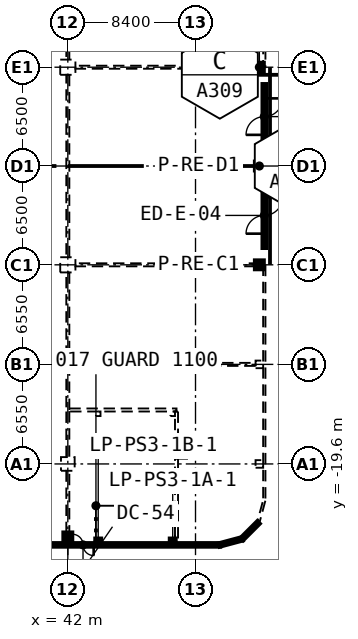
"""IFC4 building model, lengths in metres.
Left out: names, types, materials, properties, quantities, classifications, styles, units other than length and angle.
Written with IfcOpenShell. Run it as: python <this file> out.ifc"""

import sys

from ifc_helpers import new_model, si_unit, direction, frame, frame_2d, origin, origin_2d, place, context, subcontext, project, spatial, rectangle, hollow_rectangle, extrude, element, fill, save


model = new_model("IFC4")
c1 = context("Model", 3, precision=1e-05, world=origin(), true_north=direction((0.0, 1.0)))
c2 = subcontext(c1, "Body", "Model", "MODEL_VIEW")
j1 = project(units=[si_unit("LENGTHUNIT", "METRE"), si_unit("PLANEANGLEUNIT", "RADIAN")], contexts=[c1])
p1 = place(None, origin())
s1 = spatial("IfcSite", under=j1, at=p1, CompositionType="ELEMENT")
p2 = place(p1, origin())
s2 = spatial("IfcBuilding", under=s1, at=p2, CompositionType="ELEMENT")
p3 = place(p2, origin())
s3 = spatial("IfcBuildingStorey", under=s2, at=p3, CompositionType="ELEMENT", Elevation=0.0)
p4 = place(p3, frame((42.0, -19.6, -0.3), z_axis=(0.0, 0.0, 1.0), x_axis=(1.0, 0.0, 0.0)))
e1 = element("IfcColumn", 1, at=p4, inside=s3, PredefinedType="COLUMN", context=c2, shape_type="SweptSolid", body=[
    extrude(hollow_rectangle(XDim=0.9, YDim=0.9, WallThickness=0.036, at=origin_2d()), origin(), (0.0, 0.0, 1.0), 8.9),
])
for number, where, z_axis, x_axis in (
    (2, (42.0, -6.5, -0.3), (0.0, 0.0, 1.0), (1.0, 0.0, 0.0)),
    (3, (42.0, 6.5, -0.3), (0.0, 0.0, 1.0), (1.0, 0.0, 0.0)),
):
    element("IfcColumn", number, at=place(p3, frame(where, z_axis=z_axis, x_axis=x_axis)), inside=s3, PredefinedType="COLUMN", context=c2, shape_type="SweptSolid", body=[
        extrude(hollow_rectangle(XDim=1.0, YDim=1.0, WallThickness=0.04, at=origin_2d()), origin(), (0.0, 0.0, 1.0), 8.9),
    ])
for number, where, z_axis, x_axis in (
    (4, (49.603, -18.803, -0.3), (0.0, 0.0, 1.0), (1.0, 0.0, 0.0)),
    (5, (50.4, -6.5, -0.3), (0.0, 0.0, 1.0), (1.0, 0.0, 0.0)),
    (6, (50.4, 6.5, -0.3), (0.0, 0.0, 1.0), (1.0, 0.0, 0.0)),
):
    element("IfcColumn", number, at=place(p3, frame(where, z_axis=z_axis, x_axis=x_axis)), inside=s3, PredefinedType="COLUMN", context=c2, shape_type="SweptSolid", body=[
        extrude(hollow_rectangle(XDim=0.9, YDim=0.9, WallThickness=0.036, at=origin_2d()), origin(), (0.0, 0.0, 1.0), 8.9),
    ])
for number, where, z_axis, x_axis in (
    (7, (42.0, -24.4, -0.3), (0.0, 0.0, 1.0), (1.0, 0.0, 0.0)),
    (8, (54.6, -19.6, -0.3), (0.0, 0.0, 1.0), (1.0, 0.0, 0.0)),
    (9, (54.6, -13.05, -0.3), (0.0, 0.0, 1.0), (1.0, 0.0, 0.0)),
    (10, (54.6, -6.5, -0.3), (0.0, 0.0, 1.0), (1.0, 0.0, 0.0)),
    (11, (54.6, 0.0, -0.3), (0.0, 0.0, 1.0), (1.0, 0.0, 0.0)),
    (12, (54.6, 6.5, -0.3), (0.0, 0.0, 1.0), (1.0, 0.0, 0.0)),
):
    element("IfcColumn", number, at=place(p3, frame(where, z_axis=z_axis, x_axis=x_axis)), inside=s3, PredefinedType="COLUMN", context=c2, shape_type="SweptSolid", body=[
        extrude(hollow_rectangle(XDim=0.5, YDim=0.5, WallThickness=0.019, InnerFilletRadius=0.029, OuterFilletRadius=0.048, at=origin_2d()), origin(), (0.0, 0.0, 1.0), 8.9),
    ])
p5 = place(p3, frame((54.35, -6.5, 0.0), z_axis=(0.0, 0.0, 1.0), x_axis=(-1.0, 0.0, 0.0)))
e13 = element("IfcWall", 13, at=p5, inside=s3, PredefinedType="PARTITIONING", context=c2, shape_type="SweptSolid", body=[
    extrude(rectangle(XDim=3.5, YDim=0.2, at=frame_2d((1.75, 0.0))), origin(), (0.0, 0.0, 1.0), 8.6),
])
p6 = place(p3, frame((49.95, -6.5, 0.0), z_axis=(0.0, 0.0, 1.0), x_axis=(-1.0, 0.0, 0.0)))
e14 = element("IfcWall", 14, at=p6, inside=s3, PredefinedType="PARTITIONING", context=c2, shape_type="SweptSolid", body=[
    extrude(rectangle(XDim=7.45, YDim=0.2, at=frame_2d((3.725, 0.0))), origin(), (0.0, 0.0, 1.0), 8.6),
])
p7 = place(p3, frame((42.0, 6.0, 0.0), z_axis=(0.0, 0.0, 1.0), x_axis=(0.0, -1.0, 0.0)))
e15 = element("IfcWall", 15, at=p7, inside=s3, PredefinedType="PARTITIONING", context=c2, shape_type="SweptSolid", body=[
    extrude(rectangle(XDim=12.0, YDim=0.2, at=frame_2d((6.0, 0.0))), origin(), (0.0, 0.0, 1.0), 8.6),
])
p8 = place(p7, frame((1.85, 0.0, 0.0)))
e16 = element("IfcOpeningElement", 16, at=p8, cuts=e15, PredefinedType="OPENING", context=c2, shape_type="SweptSolid", body=[
    extrude(rectangle(XDim=1.8, YDim=2.1, at=frame_2d((0.9, 1.05))), frame((0.0, 0.11, 0.0), z_axis=(0.0, -1.0, 0.0), x_axis=(1.0, 0.0, 0.0)), (0.0, 0.0, 1.0), 0.22),
])
p9 = place(p3, frame((42.0, 13.05, 0.0), z_axis=(0.0, 0.0, 1.0), x_axis=(0.0, -1.0, 0.0)))
e17 = element("IfcWall", 17, at=p9, inside=s3, PredefinedType="PARTITIONING", context=c2, shape_type="SweptSolid", body=[
    extrude(rectangle(XDim=6.05, YDim=0.2, at=frame_2d((3.025, 0.0))), origin(), (0.0, 0.0, 1.0), 8.6),
])
p10 = place(p9, frame((2.675, 0.0, 0.0)))
e18 = element("IfcOpeningElement", 18, at=p10, cuts=e17, PredefinedType="OPENING", context=c2, shape_type="SweptSolid", body=[
    extrude(rectangle(XDim=1.2, YDim=2.1, at=frame_2d((0.6, 1.05))), frame((0.0, 0.11, 0.0), z_axis=(0.0, -1.0, 0.0), x_axis=(1.0, 0.0, 0.0)), (0.0, 0.0, 1.0), 0.22),
])
p11 = place(p3, frame((42.0, -13.05, 0.0), z_axis=(0.0, 0.0, 1.0), x_axis=(0.0, -1.0, 0.0)))
e19 = element("IfcWall", 19, at=p11, inside=s3, PredefinedType="PARTITIONING", context=c2, shape_type="SweptSolid", body=[
    extrude(rectangle(XDim=3.0, YDim=0.2, at=frame_2d((1.5, 0.0))), origin(), (0.0, 0.0, 1.0), 8.6),
])
p12 = place(p11, frame((1.6, 0.0, 0.0)))
e20 = element("IfcOpeningElement", 20, at=p12, cuts=e19, PredefinedType="OPENING", context=c2, shape_type="SweptSolid", body=[
    extrude(rectangle(XDim=1.2, YDim=2.1, at=frame_2d((0.6, 1.05))), frame((0.0, 0.11, 0.0), z_axis=(0.0, -1.0, 0.0), x_axis=(1.0, 0.0, 0.0)), (0.0, 0.0, 1.0), 0.22),
])
p13 = place(p3, frame((42.0, -7.0, 0.0), z_axis=(0.0, 0.0, 1.0), x_axis=(0.0, -1.0, 0.0)))
e21 = element("IfcWall", 21, at=p13, inside=s3, PredefinedType="PARTITIONING", context=c2, shape_type="SweptSolid", body=[
    extrude(rectangle(XDim=6.05, YDim=0.2, at=frame_2d((3.025, 0.0))), origin(), (0.0, 0.0, 1.0), 8.6),
])
p14 = place(p13, frame((2.175, 0.0, 0.0)))
e22 = element("IfcOpeningElement", 22, at=p14, cuts=e21, PredefinedType="OPENING", context=c2, shape_type="SweptSolid", body=[
    extrude(rectangle(XDim=1.2, YDim=2.1, at=frame_2d((0.6, 1.05))), frame((0.0, 0.11, 0.0), z_axis=(0.0, -1.0, 0.0), x_axis=(1.0, 0.0, 0.0)), (0.0, 0.0, 1.0), 0.22),
])
p15 = place(p3, frame((42.0, -24.15, 0.0), z_axis=(0.0, 0.0, 1.0), x_axis=(0.0, 1.0, 0.0)))
e23 = element("IfcWall", 23, at=p15, inside=s3, PredefinedType="SHEAR", context=c2, shape_type="SweptSolid", body=[
    extrude(rectangle(XDim=4.1, YDim=0.2, at=frame_2d((2.05, 0.0))), origin(), (0.0, 0.0, 1.0), 8.6),
])
p16 = place(p15, frame((1.55, 0.0, 0.0)))
e24 = element("IfcOpeningElement", 24, at=p16, cuts=e23, PredefinedType="OPENING", context=c2, shape_type="SweptSolid", body=[
    extrude(rectangle(XDim=1.2, YDim=2.1, at=frame_2d((0.6, 1.05))), frame((0.0, 0.11, 0.0), z_axis=(0.0, -1.0, 0.0), x_axis=(1.0, 0.0, 0.0)), (0.0, 0.0, 1.0), 0.22),
])
p17 = place(p3, frame((42.0, -19.15, 0.0), z_axis=(0.0, 0.0, 1.0), x_axis=(0.0, 1.0, 0.0)))
e25 = element("IfcWall", 25, at=p17, inside=s3, PredefinedType="SHEAR", context=c2, shape_type="SweptSolid", body=[
    extrude(rectangle(XDim=3.1, YDim=0.2, at=frame_2d((1.55, 0.0))), origin(), (0.0, 0.0, 1.0), 8.6),
])
p18 = place(p3, frame((42.1, -16.05, 0.0), z_axis=(0.0, 0.0, 1.0), x_axis=(1.0, 0.0, 0.0)))
e26 = element("IfcWall", 26, at=p18, inside=s3, PredefinedType="SHEAR", context=c2, shape_type="SweptSolid", body=[
    extrude(rectangle(XDim=7.05, YDim=0.2, at=frame_2d((3.525, 0.0))), origin(), (0.0, 0.0, 1.0), 8.6),
])
p19 = place(p3, frame((49.15, -16.15, 0.0), z_axis=(0.0, 0.0, 1.0), x_axis=(0.0, -1.0, 0.0)))
e27 = element("IfcWall", 27, at=p19, inside=s3, PredefinedType="SHEAR", context=c2, shape_type="SweptSolid", body=[
    extrude(rectangle(XDim=2.203, YDim=0.2, at=frame_2d((1.102, 0.0))), origin(), (0.0, 0.0, 1.0), 8.6),
])
p20 = place(p3, frame((49.15, -19.253, 0.0), z_axis=(0.0, 0.0, 1.0), x_axis=(0.0, -1.0, 0.0)))
e28 = element("IfcWall", 28, at=p20, inside=s3, PredefinedType="SHEAR", context=c2, shape_type="SweptSolid", body=[
    extrude(rectangle(XDim=5.597, YDim=0.2, at=frame_2d((2.798, 0.0))), origin(), (0.0, 0.0, 1.0), 8.6),
])
p21 = place(p3, frame((54.35, 6.5, 0.0), z_axis=(0.0, 0.0, 1.0), x_axis=(-1.0, 0.0, 0.0)))
e29 = element("IfcWall", 29, at=p21, inside=s3, PredefinedType="PARTITIONING", context=c2, shape_type="SweptSolid", body=[
    extrude(rectangle(XDim=3.5, YDim=0.2, at=frame_2d((1.75, 0.0))), origin(), (0.0, 0.0, 1.0), 8.6),
])
p22 = place(p3, frame((49.95, 6.5, 0.0), z_axis=(0.0, 0.0, 1.0), x_axis=(-1.0, 0.0, 0.0)))
e30 = element("IfcWall", 30, at=p22, inside=s3, PredefinedType="PARTITIONING", context=c2, shape_type="SweptSolid", body=[
    extrude(rectangle(XDim=7.45, YDim=0.2, at=frame_2d((3.725, 0.0))), origin(), (0.0, 0.0, 1.0), 8.6),
])
p23 = place(p3, frame((54.35, -13.05, 0.0), z_axis=(0.0, 0.0, 1.0), x_axis=(-1.0, 0.0, 0.0)))
e31 = element("IfcWall", 31, at=p23, inside=s3, PredefinedType="PARTITIONING", context=c2, shape_type="SweptSolid", body=[
    extrude(rectangle(XDim=12.25, YDim=0.2, at=frame_2d((6.125, 0.0))), origin(), (0.0, 0.0, 1.0), 8.6),
])
p24 = place(p3, frame((54.922, -22.0, 0.0), z_axis=(0.0, 0.0, 1.0), x_axis=(-0.258741535379, -0.965946591624, 0.0)))
e32 = element("IfcWall", 32, at=p24, inside=s3, PredefinedType="STANDARD", context=c2, shape_type="SweptSolid", body=[
    extrude(rectangle(XDim=1.493, YDim=0.15, at=frame_2d((0.746, 0.0))), origin(), (0.0, 0.0, 1.0), 8.6),
])
p25 = place(p3, frame((54.517, -23.475, 0.0), z_axis=(0.0, 0.0, 1.0), x_axis=(-0.707106781187, -0.707106781187, 0.0)))
e33 = element("IfcWall", 33, at=p25, inside=s3, PredefinedType="STANDARD", context=c2, shape_type="SweptSolid", body=[
    extrude(rectangle(XDim=1.473, YDim=0.15, at=frame_2d((0.736, 0.0))), origin(), (0.0, 0.0, 1.0), 8.6),
])
p26 = place(p3, frame((53.442, -24.536, 0.0), z_axis=(0.0, 0.0, 1.0), x_axis=(-0.965946591624, -0.258741535379, 0.0)))
e34 = element("IfcWall", 34, at=p26, inside=s3, PredefinedType="STANDARD", context=c2, shape_type="SweptSolid", body=[
    extrude(rectangle(XDim=1.493, YDim=0.15, at=frame_2d((0.746, 0.0))), origin(), (0.0, 0.0, 1.0), 8.6),
])
p27 = place(p3, frame((51.98, -24.925, 0.0), z_axis=(0.0, 0.0, 1.0), x_axis=(-1.0, 0.0, 0.0)))
e35 = element("IfcWall", 35, at=p27, inside=s3, PredefinedType="STANDARD", context=c2, shape_type="SweptSolid", body=[
    extrude(rectangle(XDim=35.18, YDim=0.15, at=frame_2d((17.59, 0.0))), origin(), (0.0, 0.0, 1.0), 8.6),
])
p28 = place(p27, frame((8.28, 0.0, 0.0)))
e36 = element("IfcOpeningElement", 36, at=p28, cuts=e35, PredefinedType="OPENING", context=c2, shape_type="SweptSolid", body=[
    extrude(rectangle(XDim=1.4, YDim=2.1, at=frame_2d((0.7, 1.05))), frame((0.0, 0.085, 0.0), z_axis=(0.0, -1.0, 0.0), x_axis=(1.0, 0.0, 0.0)), (0.0, 0.0, 1.0), 0.17),
])
p29 = place(p27, frame((27.555, 0.0, 0.0)))
e37 = element("IfcOpeningElement", 37, at=p29, cuts=e35, PredefinedType="OPENING", context=c2, shape_type="SweptSolid", body=[
    extrude(rectangle(XDim=1.8, YDim=2.1, at=frame_2d((0.9, 1.05))), frame((0.0, 0.085, 0.0), z_axis=(0.0, -1.0, 0.0), x_axis=(1.0, 0.0, 0.0)), (0.0, 0.0, 1.0), 0.17),
])
p30 = place(p27, frame((31.53, 0.0, 0.0)))
e38 = element("IfcOpeningElement", 38, at=p30, cuts=e35, PredefinedType="OPENING", context=c2, shape_type="SweptSolid", body=[
    extrude(rectangle(XDim=1.8, YDim=2.1, at=frame_2d((0.9, 1.05))), frame((0.0, 0.085, 0.0), z_axis=(0.0, -1.0, 0.0), x_axis=(1.0, 0.0, 0.0)), (0.0, 0.0, 1.0), 0.17),
])
p31 = place(p27, frame((21.68, 0.0, 0.0)))
e39 = element("IfcOpeningElement", 39, at=p31, cuts=e35, PredefinedType="OPENING", context=c2, shape_type="SweptSolid", body=[
    extrude(rectangle(XDim=1.8, YDim=2.1, at=frame_2d((0.9, 1.05))), frame((0.0, 0.085, 0.0), z_axis=(0.0, -1.0, 0.0), x_axis=(1.0, 0.0, 0.0)), (0.0, 0.0, 1.0), 0.17),
])
p32 = place(p3, frame((54.925, 21.98, 0.0), z_axis=(0.0, 0.0, 1.0), x_axis=(0.0, -1.0, 0.0)))
e40 = element("IfcWall", 40, at=p32, inside=s3, PredefinedType="STANDARD", context=c2, shape_type="SweptSolid", body=[
    extrude(rectangle(XDim=15.48, YDim=0.15, at=frame_2d((7.74, 0.0))), origin(), (0.0, 0.0, 1.0), 8.6),
])
p33 = place(p32, frame((4.78, 0.0, 0.0)))
e41 = element("IfcOpeningElement", 41, at=p33, cuts=e40, PredefinedType="OPENING", context=c2, shape_type="SweptSolid", body=[
    extrude(rectangle(XDim=1.8, YDim=2.1, at=frame_2d((0.9, 1.05))), frame((0.0, 0.085, 0.0), z_axis=(0.0, -1.0, 0.0), x_axis=(1.0, 0.0, 0.0)), (0.0, 0.0, 1.0), 0.17),
])
p34 = place(p32, frame((11.305, 0.0, 0.0)))
e42 = element("IfcOpeningElement", 42, at=p34, cuts=e40, PredefinedType="OPENING", context=c2, shape_type="SweptSolid", body=[
    extrude(rectangle(XDim=1.8, YDim=2.1, at=frame_2d((0.9, 1.05))), frame((0.0, 0.085, 0.0), z_axis=(0.0, -1.0, 0.0), x_axis=(1.0, 0.0, 0.0)), (0.0, 0.0, 1.0), 0.17),
])
p35 = place(p3, frame((54.925, 5.35, 0.0), z_axis=(0.0, 0.0, 1.0), x_axis=(0.0, -1.0, 0.0)))
e43 = element("IfcWall", 43, at=p35, inside=s3, PredefinedType="STANDARD", context=c2, shape_type="SweptSolid", body=[
    extrude(rectangle(XDim=4.2, YDim=0.15, at=frame_2d((2.1, 0.0))), origin(), (0.0, 0.0, 1.0), 8.6),
])
p36 = place(p35, frame((0.9, 0.0, 0.0)))
e44 = element("IfcOpeningElement", 44, at=p36, cuts=e43, PredefinedType="OPENING", context=c2, shape_type="SweptSolid", body=[
    extrude(rectangle(XDim=2.4, YDim=2.1, at=frame_2d((1.2, 1.05))), frame((0.0, 0.085, 0.0), z_axis=(0.0, -1.0, 0.0), x_axis=(1.0, 0.0, 0.0)), (0.0, 0.0, 1.0), 0.17),
])
p37 = place(p3, frame((54.925, -1.15, 0.0), z_axis=(0.0, 0.0, 1.0), x_axis=(0.0, -1.0, 0.0)))
e45 = element("IfcWall", 45, at=p37, inside=s3, PredefinedType="STANDARD", context=c2, shape_type="SweptSolid", body=[
    extrude(rectangle(XDim=4.2, YDim=0.15, at=frame_2d((2.1, 0.0))), origin(), (0.0, 0.0, 1.0), 8.6),
])
p38 = place(p37, frame((0.9, 0.0, 0.0)))
e46 = element("IfcOpeningElement", 46, at=p38, cuts=e45, PredefinedType="OPENING", context=c2, shape_type="SweptSolid", body=[
    extrude(rectangle(XDim=2.4, YDim=2.1, at=frame_2d((1.2, 1.05))), frame((0.0, 0.085, 0.0), z_axis=(0.0, -1.0, 0.0), x_axis=(1.0, 0.0, 0.0)), (0.0, 0.0, 1.0), 0.17),
])
p39 = place(p3, frame((54.925, -6.5, 0.0), z_axis=(0.0, 0.0, 1.0), x_axis=(0.0, -1.0, 0.0)))
e47 = element("IfcWall", 47, at=p39, inside=s3, PredefinedType="STANDARD", context=c2, shape_type="SweptSolid", body=[
    extrude(rectangle(XDim=15.48, YDim=0.15, at=frame_2d((7.74, 0.0))), origin(), (0.0, 0.0, 1.0), 8.6),
])
p40 = place(p39, frame((2.375, 0.0, 0.0)))
e48 = element("IfcOpeningElement", 48, at=p40, cuts=e47, PredefinedType="OPENING", context=c2, shape_type="SweptSolid", body=[
    extrude(rectangle(XDim=1.8, YDim=2.1, at=frame_2d((0.9, 1.05))), frame((0.0, 0.085, 0.0), z_axis=(0.0, -1.0, 0.0), x_axis=(1.0, 0.0, 0.0)), (0.0, 0.0, 1.0), 0.17),
])
p41 = place(p39, frame((8.925, 0.0, 0.0)))
e49 = element("IfcOpeningElement", 49, at=p41, cuts=e47, PredefinedType="OPENING", context=c2, shape_type="SweptSolid", body=[
    extrude(rectangle(XDim=1.8, YDim=2.1, at=frame_2d((0.9, 1.05))), frame((0.0, 0.085, 0.0), z_axis=(0.0, -1.0, 0.0), x_axis=(1.0, 0.0, 0.0)), (0.0, 0.0, 1.0), 0.17),
])
for number, where, z_axis, x_axis in (
    (50, (48.9, -24.7, 0.0), (0.0, 0.0, 1.0), (1.0, 0.0, 0.0)),
    (51, (44.0, -24.7, 0.0), (0.0, 0.0, 1.0), (1.0, 0.0, 0.0)),
    (52, (48.9, -16.3, 0.0), (0.0, 0.0, 1.0), (1.0, 0.0, 0.0)),
    (53, (44.0, -16.3, 0.0), (0.0, 0.0, 1.0), (1.0, 0.0, 0.0)),
):
    element("IfcColumn", number, at=place(p3, frame(where, z_axis=z_axis, x_axis=x_axis)), inside=s3, PredefinedType="COLUMN", context=c2, shape_type="SweptSolid", body=[
        extrude(rectangle(XDim=0.3, YDim=0.3, at=origin_2d()), origin(), (0.0, 0.0, 1.0), 8.7),
    ])
p42 = place(p16, origin())
e54 = element("IfcDoor", 54, at=p42, inside=s3, OperationType="SINGLE_SWING_LEFT", PredefinedType="DOOR", context=c2, shape_type="SweptSolid", body=[
    extrude(rectangle(XDim=1.2, YDim=2.1, at=frame_2d((0.6, 1.05))), frame((0.0, 0.025, 0.0), z_axis=(0.0, -1.0, 0.0), x_axis=(1.0, 0.0, 0.0)), (0.0, 0.0, 1.0), 0.05),
])
fill(e24, e54)
p43 = place(p8, origin())
e55 = element("IfcDoor", 55, at=p43, inside=s3, OperationType="DOUBLE_DOOR_SINGLE_SWING", PredefinedType="DOOR", context=c2, shape_type="SweptSolid", body=[
    extrude(rectangle(XDim=1.8, YDim=2.1, at=frame_2d((0.9, 1.05))), frame((0.0, 0.025, 0.0), z_axis=(0.0, -1.0, 0.0), x_axis=(1.0, 0.0, 0.0)), (0.0, 0.0, 1.0), 0.05),
])
fill(e16, e55)
p44 = place(p14, origin())
e56 = element("IfcDoor", 56, at=p44, inside=s3, OperationType="SINGLE_SWING_LEFT", PredefinedType="DOOR", context=c2, shape_type="SweptSolid", body=[
    extrude(rectangle(XDim=1.2, YDim=2.1, at=frame_2d((0.6, 1.05))), frame((0.0, 0.025, 0.0), z_axis=(0.0, -1.0, 0.0), x_axis=(1.0, 0.0, 0.0)), (0.0, 0.0, 1.0), 0.05),
])
fill(e22, e56)
p45 = place(p12, origin())
e57 = element("IfcDoor", 57, at=p45, inside=s3, OperationType="SINGLE_SWING_LEFT", PredefinedType="DOOR", context=c2, shape_type="SweptSolid", body=[
    extrude(rectangle(XDim=1.2, YDim=2.1, at=frame_2d((0.6, 1.05))), frame((0.0, 0.025, 0.0), z_axis=(0.0, -1.0, 0.0), x_axis=(1.0, 0.0, 0.0)), (0.0, 0.0, 1.0), 0.05),
])
fill(e20, e57)
p46 = place(p28, origin())
e58 = element("IfcDoor", 58, at=p46, inside=s3, OperationType="DOUBLE_DOOR_SINGLE_SWING", PredefinedType="DOOR", context=c2, shape_type="SweptSolid", body=[
    extrude(rectangle(XDim=1.4, YDim=2.1, at=frame_2d((0.7, 1.05))), frame((0.0, 0.025, 0.0), z_axis=(0.0, -1.0, 0.0), x_axis=(1.0, 0.0, 0.0)), (0.0, 0.0, 1.0), 0.05),
])
fill(e36, e58)
p47 = place(p36, origin())
e59 = element("IfcDoor", 59, at=p47, inside=s3, OperationType="DOUBLE_DOOR_DOUBLE_SWING", PredefinedType="DOOR", context=c2, shape_type="SweptSolid", body=[
    extrude(rectangle(XDim=2.4, YDim=2.1, at=frame_2d((1.2, 1.05))), frame((0.0, 0.025, 0.0), z_axis=(0.0, -1.0, 0.0), x_axis=(1.0, 0.0, 0.0)), (0.0, 0.0, 1.0), 0.05),
])
fill(e44, e59)
p48 = place(p38, origin())
e60 = element("IfcDoor", 60, at=p48, inside=s3, OperationType="DOUBLE_DOOR_DOUBLE_SWING", PredefinedType="DOOR", context=c2, shape_type="SweptSolid", body=[
    extrude(rectangle(XDim=2.4, YDim=2.1, at=frame_2d((1.2, 1.05))), frame((0.0, 0.025, 0.0), z_axis=(0.0, -1.0, 0.0), x_axis=(1.0, 0.0, 0.0)), (0.0, 0.0, 1.0), 0.05),
])
fill(e46, e60)
p49 = place(p40, origin())
e61 = element("IfcDoor", 61, at=p49, inside=s3, OperationType="DOUBLE_DOOR_DOUBLE_SWING", PredefinedType="DOOR", context=c2, shape_type="SweptSolid", body=[
    extrude(rectangle(XDim=1.8, YDim=2.1, at=frame_2d((0.9, 1.05))), frame((0.0, 0.025, 0.0), z_axis=(0.0, -1.0, 0.0), x_axis=(1.0, 0.0, 0.0)), (0.0, 0.0, 1.0), 0.05),
])
fill(e48, e61)
p50 = place(p41, origin())
e62 = element("IfcDoor", 62, at=p50, inside=s3, OperationType="DOUBLE_DOOR_DOUBLE_SWING", PredefinedType="DOOR", context=c2, shape_type="SweptSolid", body=[
    extrude(rectangle(XDim=1.8, YDim=2.1, at=frame_2d((0.9, 1.05))), frame((0.0, 0.025, 0.0), z_axis=(0.0, -1.0, 0.0), x_axis=(1.0, 0.0, 0.0)), (0.0, 0.0, 1.0), 0.05),
])
fill(e49, e62)
save(model, sys.argv[1])
